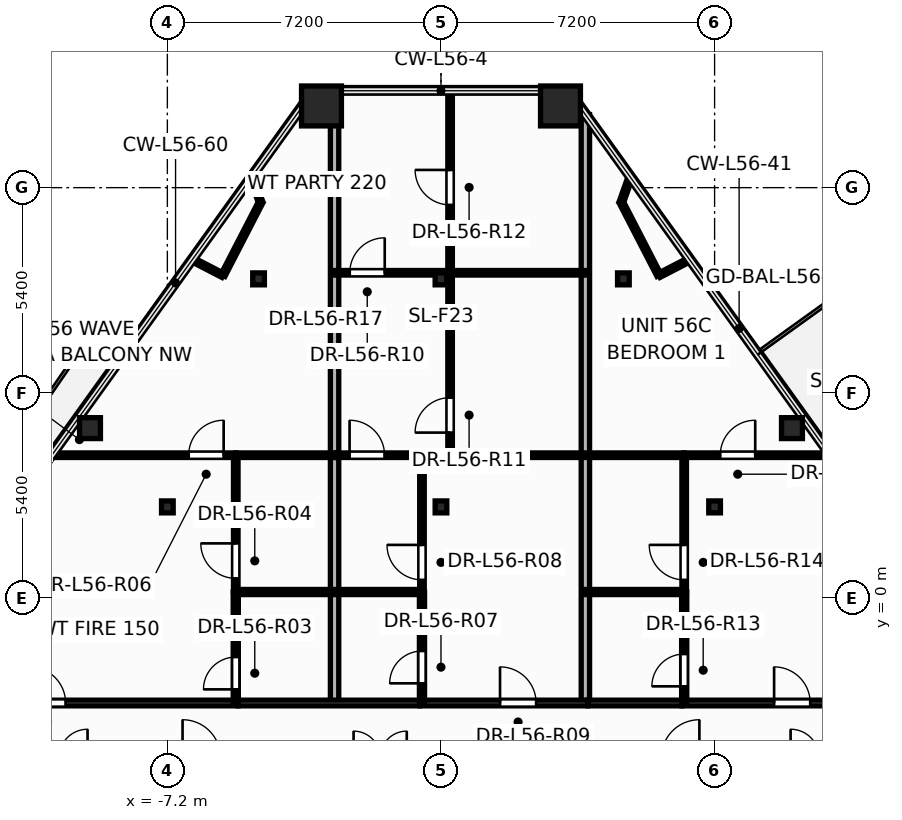
"""IFC4 building model, lengths in metres.
Left out: names, types, materials, properties, quantities, classifications, styles, units other than length and angle.
Written with IfcOpenShell. Run it as: python <this file> out.ifc"""

import sys

from ifc_helpers import new_model, si_unit, direction, frame, frame_2d, origin, origin_2d, place, context, subcontext, project, spatial, rectangle, hollow_rectangle, hollow_circle, i_section, extrude, element, fill, save


model = new_model("IFC4")
c1 = context("Model", 3, precision=1e-05, world=origin(), true_north=direction((0.0, 1.0)))
c2 = subcontext(c1, "Body", "Model", "MODEL_VIEW")
j1 = project(units=[si_unit("LENGTHUNIT", "METRE"), si_unit("PLANEANGLEUNIT", "RADIAN")], contexts=[c1])
p1 = place(None, origin())
s1 = spatial("IfcSite", under=j1, at=p1, CompositionType="ELEMENT")
p2 = place(p1, origin())
s2 = spatial("IfcBuilding", under=s1, at=p2, CompositionType="ELEMENT")
p3 = place(p2, frame((0.0, 0.0, 214.5)))
s3 = spatial("IfcBuildingStorey", under=s2, at=p3, CompositionType="ELEMENT", Elevation=214.5)
for number, where, z_axis, x_axis in (
    (1, (3.145, 12.95, 0.0), (0.0, 0.0, 1.0), (1.0, 0.0, 0.0)),
    (2, (-3.145, 12.95, 0.0), (0.0, 0.0, 1.0), (1.0, 0.0, 0.0)),
):
    element("IfcColumn", number, at=place(p3, frame(where, z_axis=z_axis, x_axis=x_axis)), inside=s3, PredefinedType="COLUMN", context=c2, shape_type="SweptSolid", body=[
        extrude(hollow_rectangle(XDim=1.05, YDim=1.05, WallThickness=0.045, at=origin_2d()), origin(), (0.0, 0.0, 1.0), 3.6),
    ])
for number, where, z_axis, x_axis in (
    (3, (9.236, 4.473, 0.0), (0.0, 0.0, 1.0), (1.0, 0.0, 0.0)),
    (4, (-9.236, 4.473, 0.0), (0.0, 0.0, 1.0), (1.0, 0.0, 0.0)),
):
    element("IfcColumn", number, at=place(p3, frame(where, z_axis=z_axis, x_axis=x_axis)), inside=s3, PredefinedType="COLUMN", context=c2, shape_type="SweptSolid", body=[
        extrude(hollow_circle(Radius=0.275, WallThickness=0.024, at=origin_2d()), origin(), (0.0, 0.0, 1.0), 3.6),
    ])
for number, where, z_axis, x_axis in (
    (5, (-7.2, 2.4, 0.0), (0.0, 0.0, 1.0), (1.0, 0.0, 0.0)),
    (6, (0.0, 2.4, 0.0), (0.0, 0.0, 1.0), (1.0, 0.0, 0.0)),
    (7, (7.2, 2.4, 0.0), (0.0, 0.0, 1.0), (1.0, 0.0, 0.0)),
    (8, (-4.8, 8.4, 0.0), (0.0, 0.0, 1.0), (1.0, 0.0, 0.0)),
    (9, (0.0, 8.4, 0.0), (0.0, 0.0, 1.0), (1.0, 0.0, 0.0)),
    (10, (4.8, 8.4, 0.0), (0.0, 0.0, 1.0), (1.0, 0.0, 0.0)),
):
    element("IfcColumn", number, at=place(p3, frame(where, z_axis=z_axis, x_axis=x_axis)), inside=s3, PredefinedType="COLUMN", context=c2, shape_type="SweptSolid", body=[
        extrude(i_section(OverallWidth=0.307, OverallDepth=0.314, WebThickness=0.012, FlangeThickness=0.019, at=origin_2d()), origin(), (0.0, 0.0, 1.0), 3.6),
    ])
p4 = place(p3, frame((-12.5, -2.76, 0.0), z_axis=(0.0, 0.0, 1.0), x_axis=(1.0, 0.0, 0.0)))
e11 = element("IfcWall", 11, at=p4, inside=s3, PredefinedType="PARTITIONING", context=c2, shape_type="SweptSolid", body=[
    extrude(rectangle(XDim=7.16, YDim=0.15, at=frame_2d((3.58, 0.0))), origin(), (0.0, 0.0, 1.0), 2.32),
])
p5 = place(p4, frame((1.672, 0.0, 0.0)))
e12 = element("IfcOpeningElement", 12, at=p5, cuts=e11, PredefinedType="OPENING", context=c2, shape_type="SweptSolid", body=[
    extrude(rectangle(XDim=0.956, YDim=2.104, at=frame_2d((0.475, 1.052))), frame((0.0, 0.085, 0.0), z_axis=(0.0, -1.0, 0.0), x_axis=(1.0, 0.0, 0.0)), (0.0, 0.0, 1.0), 0.17),
])
p6 = place(p3, frame((6.34, -2.76, 0.0), z_axis=(0.0, 0.0, 1.0), x_axis=(1.0, 0.0, 0.0)))
e13 = element("IfcWall", 13, at=p6, inside=s3, PredefinedType="PARTITIONING", context=c2, shape_type="SweptSolid", body=[
    extrude(rectangle(XDim=6.16, YDim=0.15, at=frame_2d((3.08, 0.0))), origin(), (0.0, 0.0, 1.0), 2.32),
])
p7 = place(p6, frame((2.426, 0.0, 0.0)))
e14 = element("IfcOpeningElement", 14, at=p7, cuts=e13, PredefinedType="OPENING", context=c2, shape_type="SweptSolid", body=[
    extrude(rectangle(XDim=0.956, YDim=2.104, at=frame_2d((0.475, 1.052))), frame((0.0, 0.085, 0.0), z_axis=(0.0, -1.0, 0.0), x_axis=(1.0, 0.0, 0.0)), (0.0, 0.0, 1.0), 0.17),
])
p8 = place(p3, frame((-2.8, -2.76, 0.0), z_axis=(0.0, 0.0, 1.0), x_axis=(0.0, 1.0, 0.0)))
e15 = element("IfcWall", 15, at=p8, inside=s3, PredefinedType="PARTITIONING", context=c2, shape_type="SweptSolid", body=[
    extrude(rectangle(XDim=16.11, YDim=0.22, at=frame_2d((8.055, 0.0))), origin(), (0.0, 0.0, 1.0), 2.32),
])
p9 = place(p3, frame((-10.241, 3.76, 0.0), z_axis=(0.0, 0.0, 1.0), x_axis=(1.0, 0.0, 0.0)))
e16 = element("IfcWall", 16, at=p9, inside=s3, PredefinedType="PARTITIONING", context=c2, shape_type="SweptSolid", body=[
    extrude(rectangle(XDim=4.841, YDim=0.12, at=frame_2d((2.42, 0.0))), origin(), (0.0, 0.0, 1.0), 2.32),
])
p10 = place(p9, frame((3.602, 0.0, 0.0)))
e17 = element("IfcOpeningElement", 17, at=p10, cuts=e16, PredefinedType="OPENING", context=c2, shape_type="SweptSolid", body=[
    extrude(rectangle(XDim=0.926, YDim=2.104, at=frame_2d((0.46, 1.052))), frame((0.0, 0.07, 0.0), z_axis=(0.0, -1.0, 0.0), x_axis=(1.0, 0.0, 0.0)), (0.0, 0.0, 1.0), 0.14),
])
p11 = place(p3, frame((0.24, 3.76, 0.0), z_axis=(0.0, 0.0, 1.0), x_axis=(0.0, 1.0, 0.0)))
e18 = element("IfcWall", 18, at=p11, inside=s3, PredefinedType="PARTITIONING", context=c2, shape_type="SweptSolid", body=[
    extrude(rectangle(XDim=4.8, YDim=0.12, at=frame_2d((2.4, 0.0))), origin(), (0.0, 0.0, 1.0), 2.32),
])
p12 = place(p11, frame((0.595, 0.0, 0.0)))
e19 = element("IfcOpeningElement", 19, at=p12, cuts=e18, PredefinedType="OPENING", context=c2, shape_type="SweptSolid", body=[
    extrude(rectangle(XDim=0.926, YDim=2.104, at=frame_2d((0.46, 1.052))), frame((0.0, 0.07, 0.0), z_axis=(0.0, -1.0, 0.0), x_axis=(1.0, 0.0, 0.0)), (0.0, 0.0, 1.0), 0.14),
])
p13 = place(p3, frame((3.8, -2.76, 0.0), z_axis=(0.0, 0.0, 1.0), x_axis=(0.0, 1.0, 0.0)))
e20 = element("IfcWall", 20, at=p13, inside=s3, PredefinedType="PARTITIONING", context=c2, shape_type="SweptSolid", body=[
    extrude(rectangle(XDim=15.483, YDim=0.22, at=frame_2d((7.742, 0.0))), origin(), (0.0, 0.0, 1.0), 2.32),
])
p14 = place(p3, frame((0.24, 8.56, 0.0), z_axis=(0.0, 0.0, 1.0), x_axis=(0.0, 1.0, 0.0)))
e21 = element("IfcWall", 21, at=p14, inside=s3, PredefinedType="PARTITIONING", context=c2, shape_type="SweptSolid", body=[
    extrude(rectangle(XDim=4.79, YDim=0.12, at=frame_2d((2.395, 0.0))), origin(), (0.0, 0.0, 1.0), 2.32),
])
p15 = place(p14, frame((1.786, 0.0, 0.0)))
e22 = element("IfcOpeningElement", 22, at=p15, cuts=e21, PredefinedType="OPENING", context=c2, shape_type="SweptSolid", body=[
    extrude(rectangle(XDim=0.926, YDim=2.104, at=frame_2d((0.46, 1.052))), frame((0.0, 0.07, 0.0), z_axis=(0.0, -1.0, 0.0), x_axis=(1.0, 0.0, 0.0)), (0.0, 0.0, 1.0), 0.14),
])
p16 = place(p3, frame((-0.56, -2.76, 0.0), z_axis=(0.0, 0.0, 1.0), x_axis=(1.0, 0.0, 0.0)))
e23 = element("IfcWall", 23, at=p16, inside=s3, PredefinedType="PARTITIONING", context=c2, shape_type="SweptSolid", body=[
    extrude(rectangle(XDim=4.42, YDim=0.15, at=frame_2d((2.21, 0.0))), origin(), (0.0, 0.0, 1.0), 2.32),
])
p17 = place(p16, frame((2.114, 0.0, 0.0)))
e24 = element("IfcOpeningElement", 24, at=p17, cuts=e23, PredefinedType="OPENING", context=c2, shape_type="SweptSolid", body=[
    extrude(rectangle(XDim=0.956, YDim=2.104, at=frame_2d((0.475, 1.052))), frame((0.0, 0.085, 0.0), z_axis=(0.0, -1.0, 0.0), x_axis=(1.0, 0.0, 0.0)), (0.0, 0.0, 1.0), 0.17),
])
p18 = place(p3, frame((6.4, 3.76, 0.0), z_axis=(0.0, 0.0, 1.0), x_axis=(1.0, 0.0, 0.0)))
e25 = element("IfcWall", 25, at=p18, inside=s3, PredefinedType="PARTITIONING", context=c2, shape_type="SweptSolid", body=[
    extrude(rectangle(XDim=3.841, YDim=0.12, at=frame_2d((1.92, 0.0))), origin(), (0.0, 0.0, 1.0), 2.32),
])
p19 = place(p18, frame((0.949, 0.0, 0.0)))
e26 = element("IfcOpeningElement", 26, at=p19, cuts=e25, PredefinedType="OPENING", context=c2, shape_type="SweptSolid", body=[
    extrude(rectangle(XDim=0.926, YDim=2.104, at=frame_2d((0.46, 1.052))), frame((0.0, 0.07, 0.0), z_axis=(0.0, -1.0, 0.0), x_axis=(1.0, 0.0, 0.0)), (0.0, 0.0, 1.0), 0.14),
])
p20 = place(p3, frame((-0.5, 3.76, 0.0), z_axis=(0.0, 0.0, 1.0), x_axis=(1.0, 0.0, 0.0)))
e27 = element("IfcWall", 27, at=p20, inside=s3, PredefinedType="PARTITIONING", context=c2, shape_type="SweptSolid", body=[
    extrude(rectangle(XDim=6.9, YDim=0.12, at=frame_2d((3.45, 0.0))), origin(), (0.0, 0.0, 1.0), 2.32),
])
p21 = place(p3, frame((-5.4, 0.16, 0.0), z_axis=(0.0, 0.0, 1.0), x_axis=(0.0, 1.0, 0.0)))
e28 = element("IfcWall", 28, at=p21, inside=s3, PredefinedType="PARTITIONING", context=c2, shape_type="SweptSolid", body=[
    extrude(rectangle(XDim=3.6, YDim=0.12, at=frame_2d((1.8, 0.0))), origin(), (0.0, 0.0, 1.0), 2.32),
])
p22 = place(p21, frame((0.36, 0.0, 0.0)))
e29 = element("IfcOpeningElement", 29, at=p22, cuts=e28, PredefinedType="OPENING", context=c2, shape_type="SweptSolid", body=[
    extrude(rectangle(XDim=0.926, YDim=2.104, at=frame_2d((0.46, 1.052))), frame((0.0, 0.07, 0.0), z_axis=(0.0, -1.0, 0.0), x_axis=(1.0, 0.0, 0.0)), (0.0, 0.0, 1.0), 0.14),
])
p23 = place(p3, frame((-0.5, 0.16, 0.0), z_axis=(0.0, 0.0, 1.0), x_axis=(0.0, 1.0, 0.0)))
e30 = element("IfcWall", 30, at=p23, inside=s3, PredefinedType="PARTITIONING", context=c2, shape_type="SweptSolid", body=[
    extrude(rectangle(XDim=3.6, YDim=0.12, at=frame_2d((1.8, 0.0))), origin(), (0.0, 0.0, 1.0), 2.32),
])
p24 = place(p23, frame((0.32, 0.0, 0.0)))
e31 = element("IfcOpeningElement", 31, at=p24, cuts=e30, PredefinedType="OPENING", context=c2, shape_type="SweptSolid", body=[
    extrude(rectangle(XDim=0.926, YDim=2.104, at=frame_2d((0.46, 1.052))), frame((0.0, 0.07, 0.0), z_axis=(0.0, -1.0, 0.0), x_axis=(1.0, 0.0, 0.0)), (0.0, 0.0, 1.0), 0.14),
])
p25 = place(p3, frame((6.4, 0.16, 0.0), z_axis=(0.0, 0.0, 1.0), x_axis=(0.0, 1.0, 0.0)))
e32 = element("IfcWall", 32, at=p25, inside=s3, PredefinedType="PARTITIONING", context=c2, shape_type="SweptSolid", body=[
    extrude(rectangle(XDim=3.6, YDim=0.12, at=frame_2d((1.8, 0.0))), origin(), (0.0, 0.0, 1.0), 2.32),
])
p26 = place(p25, frame((0.32, 0.0, 0.0)))
e33 = element("IfcOpeningElement", 33, at=p26, cuts=e32, PredefinedType="OPENING", context=c2, shape_type="SweptSolid", body=[
    extrude(rectangle(XDim=0.926, YDim=2.104, at=frame_2d((0.46, 1.052))), frame((0.0, 0.07, 0.0), z_axis=(0.0, -1.0, 0.0), x_axis=(1.0, 0.0, 0.0)), (0.0, 0.0, 1.0), 0.14),
])
p27 = place(p3, frame((0.24, 8.56, 0.0), z_axis=(0.0, 0.0, 1.0), x_axis=(1.0, 0.0, 0.0)))
e34 = element("IfcWall", 34, at=p27, inside=s3, PredefinedType="PARTITIONING", context=c2, shape_type="SweptSolid", body=[
    extrude(rectangle(XDim=3.56, YDim=0.12, at=frame_2d((1.78, 0.0))), origin(), (0.0, 0.0, 1.0), 2.32),
])
p28 = place(p3, frame((-2.8, 8.56, 0.0), z_axis=(0.0, 0.0, 1.0), x_axis=(1.0, 0.0, 0.0)))
e35 = element("IfcWall", 35, at=p28, inside=s3, PredefinedType="PARTITIONING", context=c2, shape_type="SweptSolid", body=[
    extrude(rectangle(XDim=3.04, YDim=0.12, at=frame_2d((1.52, 0.0))), origin(), (0.0, 0.0, 1.0), 2.32),
])
p29 = place(p28, frame((0.4, 0.0, 0.0)))
e36 = element("IfcOpeningElement", 36, at=p29, cuts=e35, PredefinedType="OPENING", context=c2, shape_type="SweptSolid", body=[
    extrude(rectangle(XDim=0.926, YDim=2.104, at=frame_2d((0.46, 1.052))), frame((0.0, 0.07, 0.0), z_axis=(0.0, -1.0, 0.0), x_axis=(1.0, 0.0, 0.0)), (0.0, 0.0, 1.0), 0.14),
])
p30 = place(p3, frame((-5.4, -2.76, 0.0), z_axis=(0.0, 0.0, 1.0), x_axis=(0.0, 1.0, 0.0)))
e37 = element("IfcWall", 37, at=p30, inside=s3, PredefinedType="PARTITIONING", context=c2, shape_type="SweptSolid", body=[
    extrude(rectangle(XDim=2.92, YDim=0.135, at=frame_2d((1.46, 0.0))), origin(), (0.0, 0.0, 1.0), 3.345),
])
p31 = place(p30, frame((0.359, 0.0, 0.0)))
e38 = element("IfcOpeningElement", 38, at=p31, cuts=e37, PredefinedType="OPENING", context=c2, shape_type="SweptSolid", body=[
    extrude(rectangle(XDim=0.856, YDim=2.104, at=frame_2d((0.425, 1.052))), frame((0.0, 0.078, 0.0), z_axis=(0.0, -1.0, 0.0), x_axis=(1.0, 0.0, 0.0)), (0.0, 0.0, 1.0), 0.155),
])
p32 = place(p3, frame((-0.5, -2.76, 0.0), z_axis=(0.0, 0.0, 1.0), x_axis=(0.0, 1.0, 0.0)))
e39 = element("IfcWall", 39, at=p32, inside=s3, PredefinedType="PARTITIONING", context=c2, shape_type="SweptSolid", body=[
    extrude(rectangle(XDim=2.92, YDim=0.135, at=frame_2d((1.46, 0.0))), origin(), (0.0, 0.0, 1.0), 3.345),
])
p33 = place(p32, frame((0.518, 0.0, 0.0)))
e40 = element("IfcOpeningElement", 40, at=p33, cuts=e39, PredefinedType="OPENING", context=c2, shape_type="SweptSolid", body=[
    extrude(rectangle(XDim=0.856, YDim=2.104, at=frame_2d((0.425, 1.052))), frame((0.0, 0.078, 0.0), z_axis=(0.0, -1.0, 0.0), x_axis=(1.0, 0.0, 0.0)), (0.0, 0.0, 1.0), 0.155),
])
p34 = place(p3, frame((6.4, -2.76, 0.0), z_axis=(0.0, 0.0, 1.0), x_axis=(0.0, 1.0, 0.0)))
e41 = element("IfcWall", 41, at=p34, inside=s3, PredefinedType="PARTITIONING", context=c2, shape_type="SweptSolid", body=[
    extrude(rectangle(XDim=2.92, YDim=0.135, at=frame_2d((1.46, 0.0))), origin(), (0.0, 0.0, 1.0), 3.345),
])
p35 = place(p34, frame((0.438, 0.0, 0.0)))
e42 = element("IfcOpeningElement", 42, at=p35, cuts=e41, PredefinedType="OPENING", context=c2, shape_type="SweptSolid", body=[
    extrude(rectangle(XDim=0.856, YDim=2.104, at=frame_2d((0.425, 1.052))), frame((0.0, 0.078, 0.0), z_axis=(0.0, -1.0, 0.0), x_axis=(1.0, 0.0, 0.0)), (0.0, 0.0, 1.0), 0.155),
])
p36 = place(p3, frame((-5.338, -2.76, 0.0), z_axis=(0.0, 0.0, 1.0), x_axis=(1.0, 0.0, 0.0)))
e43 = element("IfcWall", 43, at=p36, inside=s3, PredefinedType="PARTITIONING", context=c2, shape_type="SweptSolid", body=[
    extrude(rectangle(XDim=4.776, YDim=0.15, at=frame_2d((2.388, 0.0))), origin(), (0.0, 0.0, 1.0), 2.964),
])
p37 = place(p3, frame((3.862, -2.76, 0.0), z_axis=(0.0, 0.0, 1.0), x_axis=(1.0, 0.0, 0.0)))
e44 = element("IfcWall", 44, at=p37, inside=s3, PredefinedType="PARTITIONING", context=c2, shape_type="SweptSolid", body=[
    extrude(rectangle(XDim=2.476, YDim=0.15, at=frame_2d((1.238, 0.0))), origin(), (0.0, 0.0, 1.0), 3.345),
])
p38 = place(p3, frame((-5.4, 0.16, 0.0), z_axis=(0.0, 0.0, 1.0), x_axis=(1.0, 0.0, 0.0)))
e45 = element("IfcWall", 45, at=p38, inside=s3, PredefinedType="PARTITIONING", context=c2, shape_type="SweptSolid", body=[
    extrude(rectangle(XDim=4.9, YDim=0.135, at=frame_2d((2.45, 0.0))), origin(), (0.0, 0.0, 1.0), 2.964),
])
p39 = place(p3, frame((-5.4, 3.76, 0.0), z_axis=(0.0, 0.0, 1.0), x_axis=(1.0, 0.0, 0.0)))
e46 = element("IfcWall", 46, at=p39, inside=s3, PredefinedType="PARTITIONING", context=c2, shape_type="SweptSolid", body=[
    extrude(rectangle(XDim=2.6, YDim=0.12, at=frame_2d((1.3, 0.0))), origin(), (0.0, 0.0, 1.0), 3.345),
])
p40 = place(p3, frame((3.8, 0.16, 0.0), z_axis=(0.0, 0.0, 1.0), x_axis=(1.0, 0.0, 0.0)))
e47 = element("IfcWall", 47, at=p40, inside=s3, PredefinedType="PARTITIONING", context=c2, shape_type="SweptSolid", body=[
    extrude(rectangle(XDim=2.6, YDim=0.135, at=frame_2d((1.3, 0.0))), origin(), (0.0, 0.0, 1.0), 3.345),
])
p41 = place(p3, frame((-2.8, 3.76, 0.0), z_axis=(0.0, 0.0, 1.0), x_axis=(1.0, 0.0, 0.0)))
e48 = element("IfcWall", 48, at=p41, inside=s3, PredefinedType="PARTITIONING", context=c2, shape_type="SweptSolid", body=[
    extrude(rectangle(XDim=2.3, YDim=0.12, at=frame_2d((1.15, 0.0))), origin(), (0.0, 0.0, 1.0), 2.964),
])
p42 = place(p41, frame((0.395, 0.0, 0.0)))
e49 = element("IfcOpeningElement", 49, at=p42, cuts=e48, PredefinedType="OPENING", context=c2, shape_type="SweptSolid", body=[
    extrude(rectangle(XDim=0.926, YDim=2.104, at=frame_2d((0.46, 1.052))), frame((0.0, 0.07, 0.0), z_axis=(0.0, -1.0, 0.0), x_axis=(1.0, 0.0, 0.0)), (0.0, 0.0, 1.0), 0.14),
])
for number, where, z_axis, x_axis in (
    (50, (-4.745, 10.414, 0.0), (0.0, 0.0, 1.0), (-0.459, -0.889, 0.0)),
    (51, (5.738, 8.492, 0.0), (0.0, 0.0, 1.0), (-0.459, 0.889, 0.0)),
):
    element("IfcWall", number, at=place(p3, frame(where, z_axis=z_axis, x_axis=x_axis)), inside=s3, PredefinedType="PARTITIONING", context=c2, shape_type="SweptSolid", body=[
        extrude(rectangle(XDim=2.163, YDim=0.12, at=frame_2d((1.082, 0.0))), origin(), (0.0, 0.0, 1.0), 3.345),
    ])
for number, where, z_axis, x_axis in (
    (52, (-5.738, 8.492, 0.0), (0.0, 0.0, 1.0), (-0.889, 0.459, 0.0)),
    (53, (6.533, 8.903, 0.0), (0.0, 0.0, 1.0), (-0.889, -0.459, 0.0)),
):
    element("IfcWall", number, at=place(p3, frame(where, z_axis=z_axis, x_axis=x_axis)), inside=s3, PredefinedType="PARTITIONING", context=c2, shape_type="SweptSolid", body=[
        extrude(rectangle(XDim=0.895, YDim=0.12, at=frame_2d((0.448, 0.0))), origin(), (0.0, 0.0, 1.0), 2.787),
    ])
for number, where, z_axis, x_axis in (
    (54, (-4.978, 11.067, 0.0), (0.0, 0.0, 1.0), (0.335, -0.942, 0.0)),
    (55, (4.745, 10.414, 0.0), (0.0, 0.0, 1.0), (0.335, 0.942, 0.0)),
):
    element("IfcWall", number, at=place(p3, frame(where, z_axis=z_axis, x_axis=x_axis)), inside=s3, PredefinedType="PARTITIONING", context=c2, shape_type="SweptSolid", body=[
        extrude(rectangle(XDim=0.693, YDim=0.12, at=frame_2d((0.346, 0.0))), origin(), (0.0, 0.0, 1.0), 2.787),
    ])
p43 = place(p31, origin())
e56 = element("IfcDoor", 56, at=p43, inside=s3, OperationType="SINGLE_SWING_LEFT", PredefinedType="DOOR", context=c2, shape_type="SweptSolid", body=[
    extrude(rectangle(XDim=0.85, YDim=2.1, at=frame_2d((0.425, 1.05))), frame((0.0, 0.025, 0.0), z_axis=(0.0, -1.0, 0.0), x_axis=(1.0, 0.0, 0.0)), (0.0, 0.0, 1.0), 0.05),
])
fill(e38, e56)
p44 = place(p22, origin())
e57 = element("IfcDoor", 57, at=p44, inside=s3, OperationType="SINGLE_SWING_RIGHT", PredefinedType="DOOR", context=c2, shape_type="SweptSolid", body=[
    extrude(rectangle(XDim=0.92, YDim=2.1, at=frame_2d((0.46, 1.05))), frame((0.0, 0.025, 0.0), z_axis=(0.0, -1.0, 0.0), x_axis=(1.0, 0.0, 0.0)), (0.0, 0.0, 1.0), 0.05),
])
fill(e29, e57)
p45 = place(p5, origin())
e58 = element("IfcDoor", 58, at=p45, inside=s3, OperationType="SINGLE_SWING_LEFT", PredefinedType="DOOR", context=c2, shape_type="SweptSolid", body=[
    extrude(rectangle(XDim=0.95, YDim=2.1, at=frame_2d((0.475, 1.05))), frame((0.0, 0.025, 0.0), z_axis=(0.0, -1.0, 0.0), x_axis=(1.0, 0.0, 0.0)), (0.0, 0.0, 1.0), 0.05),
])
fill(e12, e58)
p46 = place(p10, origin())
e59 = element("IfcDoor", 59, at=p46, inside=s3, OperationType="SINGLE_SWING_RIGHT", PredefinedType="DOOR", context=c2, shape_type="SweptSolid", body=[
    extrude(rectangle(XDim=0.92, YDim=2.1, at=frame_2d((0.46, 1.05))), frame((0.0, 0.025, 0.0), z_axis=(0.0, -1.0, 0.0), x_axis=(1.0, 0.0, 0.0)), (0.0, 0.0, 1.0), 0.05),
])
fill(e17, e59)
p47 = place(p33, origin())
e60 = element("IfcDoor", 60, at=p47, inside=s3, OperationType="SINGLE_SWING_LEFT", PredefinedType="DOOR", context=c2, shape_type="SweptSolid", body=[
    extrude(rectangle(XDim=0.85, YDim=2.1, at=frame_2d((0.425, 1.05))), frame((0.0, 0.025, 0.0), z_axis=(0.0, -1.0, 0.0), x_axis=(1.0, 0.0, 0.0)), (0.0, 0.0, 1.0), 0.05),
])
fill(e40, e60)
p48 = place(p24, origin())
e61 = element("IfcDoor", 61, at=p48, inside=s3, OperationType="SINGLE_SWING_RIGHT", PredefinedType="DOOR", context=c2, shape_type="SweptSolid", body=[
    extrude(rectangle(XDim=0.92, YDim=2.1, at=frame_2d((0.46, 1.05))), frame((0.0, 0.025, 0.0), z_axis=(0.0, -1.0, 0.0), x_axis=(1.0, 0.0, 0.0)), (0.0, 0.0, 1.0), 0.05),
])
fill(e31, e61)
p49 = place(p17, origin())
e62 = element("IfcDoor", 62, at=p49, inside=s3, OperationType="SINGLE_SWING_LEFT", PredefinedType="DOOR", context=c2, shape_type="SweptSolid", body=[
    extrude(rectangle(XDim=0.95, YDim=2.1, at=frame_2d((0.475, 1.05))), frame((0.0, 0.025, 0.0), z_axis=(0.0, -1.0, 0.0), x_axis=(1.0, 0.0, 0.0)), (0.0, 0.0, 1.0), 0.05),
])
fill(e24, e62)
p50 = place(p29, origin())
e63 = element("IfcDoor", 63, at=p50, inside=s3, OperationType="SINGLE_SWING_RIGHT", PredefinedType="DOOR", context=c2, shape_type="SweptSolid", body=[
    extrude(rectangle(XDim=0.92, YDim=2.1, at=frame_2d((0.46, 1.05))), frame((0.0, 0.025, 0.0), z_axis=(0.0, -1.0, 0.0), x_axis=(1.0, 0.0, 0.0)), (0.0, 0.0, 1.0), 0.05),
])
fill(e36, e63)
p51 = place(p12, origin())
e64 = element("IfcDoor", 64, at=p51, inside=s3, OperationType="SINGLE_SWING_LEFT", PredefinedType="DOOR", context=c2, shape_type="SweptSolid", body=[
    extrude(rectangle(XDim=0.92, YDim=2.1, at=frame_2d((0.46, 1.05))), frame((0.0, 0.025, 0.0), z_axis=(0.0, -1.0, 0.0), x_axis=(1.0, 0.0, 0.0)), (0.0, 0.0, 1.0), 0.05),
])
fill(e19, e64)
p52 = place(p15, origin())
e65 = element("IfcDoor", 65, at=p52, inside=s3, OperationType="SINGLE_SWING_RIGHT", PredefinedType="DOOR", context=c2, shape_type="SweptSolid", body=[
    extrude(rectangle(XDim=0.92, YDim=2.1, at=frame_2d((0.46, 1.05))), frame((0.0, 0.025, 0.0), z_axis=(0.0, -1.0, 0.0), x_axis=(1.0, 0.0, 0.0)), (0.0, 0.0, 1.0), 0.05),
])
fill(e22, e65)
p53 = place(p35, origin())
e66 = element("IfcDoor", 66, at=p53, inside=s3, OperationType="SINGLE_SWING_LEFT", PredefinedType="DOOR", context=c2, shape_type="SweptSolid", body=[
    extrude(rectangle(XDim=0.85, YDim=2.1, at=frame_2d((0.425, 1.05))), frame((0.0, 0.025, 0.0), z_axis=(0.0, -1.0, 0.0), x_axis=(1.0, 0.0, 0.0)), (0.0, 0.0, 1.0), 0.05),
])
fill(e42, e66)
p54 = place(p26, origin())
e67 = element("IfcDoor", 67, at=p54, inside=s3, OperationType="SINGLE_SWING_RIGHT", PredefinedType="DOOR", context=c2, shape_type="SweptSolid", body=[
    extrude(rectangle(XDim=0.92, YDim=2.1, at=frame_2d((0.46, 1.05))), frame((0.0, 0.025, 0.0), z_axis=(0.0, -1.0, 0.0), x_axis=(1.0, 0.0, 0.0)), (0.0, 0.0, 1.0), 0.05),
])
fill(e33, e67)
p55 = place(p7, origin())
e68 = element("IfcDoor", 68, at=p55, inside=s3, OperationType="SINGLE_SWING_LEFT", PredefinedType="DOOR", context=c2, shape_type="SweptSolid", body=[
    extrude(rectangle(XDim=0.95, YDim=2.1, at=frame_2d((0.475, 1.05))), frame((0.0, 0.025, 0.0), z_axis=(0.0, -1.0, 0.0), x_axis=(1.0, 0.0, 0.0)), (0.0, 0.0, 1.0), 0.05),
])
fill(e14, e68)
p56 = place(p19, origin())
e69 = element("IfcDoor", 69, at=p56, inside=s3, OperationType="SINGLE_SWING_RIGHT", PredefinedType="DOOR", context=c2, shape_type="SweptSolid", body=[
    extrude(rectangle(XDim=0.92, YDim=2.1, at=frame_2d((0.46, 1.05))), frame((0.0, 0.025, 0.0), z_axis=(0.0, -1.0, 0.0), x_axis=(1.0, 0.0, 0.0)), (0.0, 0.0, 1.0), 0.05),
])
fill(e26, e69)
p57 = place(p42, origin())
e70 = element("IfcDoor", 70, at=p57, inside=s3, OperationType="SINGLE_SWING_LEFT", PredefinedType="DOOR", context=c2, shape_type="SweptSolid", body=[
    extrude(rectangle(XDim=0.92, YDim=2.1, at=frame_2d((0.46, 1.05))), frame((0.0, 0.025, 0.0), z_axis=(0.0, -1.0, 0.0), x_axis=(1.0, 0.0, 0.0)), (0.0, 0.0, 1.0), 0.05),
])
fill(e49, e70)
save(model, sys.argv[1])
